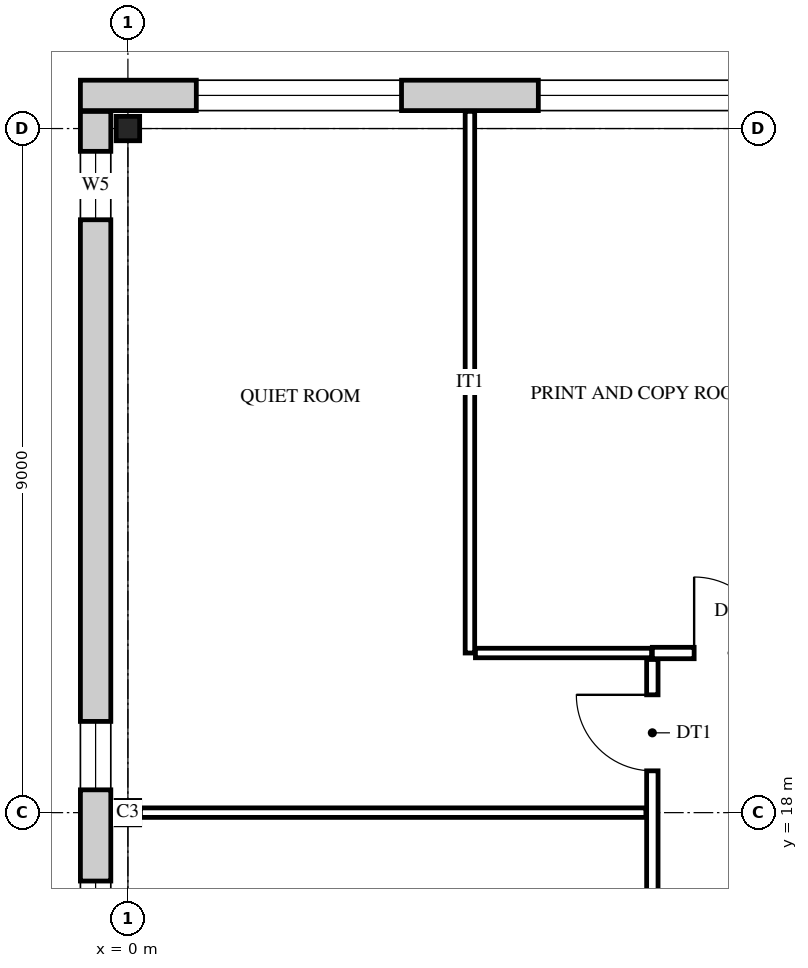
"""IFC4 building model, lengths in metres.
Left out: names, types, materials, properties, quantities, classifications, styles, units other than length and angle.
Written with IfcOpenShell. Run it as: python <this file> out.ifc"""

import sys

from ifc_helpers import new_model, si_unit, direction, frame, frame_2d, origin, origin_2d, place, context, subcontext, project, spatial, rectangle, i_section, extrude, element, fill, save


model = new_model("IFC4")
c1 = context("Model", 3, precision=1e-05, world=origin(), true_north=direction((0.0, 1.0)))
c2 = subcontext(c1, "Body", "Model", "MODEL_VIEW")
j1 = project(units=[si_unit("LENGTHUNIT", "METRE"), si_unit("PLANEANGLEUNIT", "RADIAN")], contexts=[c1])
p1 = place(None, origin())
s1 = spatial("IfcSite", under=j1, at=p1, CompositionType="ELEMENT")
p2 = place(p1, origin())
s2 = spatial("IfcBuilding", under=s1, at=p2, CompositionType="ELEMENT")
p3 = place(p2, frame((0.0, 0.0, 52.8)))
s3 = spatial("IfcBuildingStorey", under=s2, at=p3, CompositionType="ELEMENT", Elevation=52.8)
for number, where, z_axis, x_axis in (
    (1, (0.0, 18.0, 0.0), (0.0, 0.0, 1.0), (1.0, 0.0, 0.0)),
    (2, (0.0, 27.0, 0.0), (0.0, 0.0, 1.0), (1.0, 0.0, 0.0)),
):
    element("IfcColumn", number, at=place(p3, frame(where, z_axis=z_axis, x_axis=x_axis)), inside=s3, PredefinedType="COLUMN", context=c2, shape_type="SweptSolid", body=[
        extrude(i_section(OverallWidth=0.309, OverallDepth=0.321, WebThickness=0.014, FlangeThickness=0.022, FilletRadius=0.017, at=origin_2d()), origin(), (0.0, 0.0, 1.0), 4.2),
    ])
p4 = place(p3, frame((-0.425, -0.225, 0.0), z_axis=(0.0, 0.0, 1.0), x_axis=(0.0, 1.0, 0.0)))
e3 = element("IfcWall", 3, at=p4, inside=s3, PredefinedType="STANDARD", context=c2, shape_type="SweptSolid", body=[
    extrude(rectangle(XDim=27.45, YDim=0.4, at=frame_2d((13.725, 0.0))), origin(), (0.0, 0.0, 1.0), 4.2),
])
p5 = place(p4, frame((0.525, 0.0, 0.9)))
e4 = element("IfcOpeningElement", 4, at=p5, cuts=e3, PredefinedType="OPENING", context=c2, shape_type="SweptSolid", body=[
    extrude(rectangle(XDim=0.9, YDim=2.0, at=frame_2d((0.45, 1.0))), frame((0.0, 0.21, 0.0), z_axis=(0.0, -1.0, 0.0), x_axis=(1.0, 0.0, 0.0)), (0.0, 0.0, 1.0), 0.42),
])
p6 = place(p4, frame((8.025, 0.0, 0.9)))
e5 = element("IfcOpeningElement", 5, at=p6, cuts=e3, PredefinedType="OPENING", context=c2, shape_type="SweptSolid", body=[
    extrude(rectangle(XDim=0.9, YDim=2.0, at=frame_2d((0.45, 1.0))), frame((0.0, 0.21, 0.0), z_axis=(0.0, -1.0, 0.0), x_axis=(1.0, 0.0, 0.0)), (0.0, 0.0, 1.0), 0.42),
])
p7 = place(p4, frame((10.125, 0.0, 0.9)))
e6 = element("IfcOpeningElement", 6, at=p7, cuts=e3, PredefinedType="OPENING", context=c2, shape_type="SweptSolid", body=[
    extrude(rectangle(XDim=2.7, YDim=2.5, at=frame_2d((1.35, 1.25))), frame((0.0, 0.21, 0.0), z_axis=(0.0, -1.0, 0.0), x_axis=(1.0, 0.0, 0.0)), (0.0, 0.0, 1.0), 0.42),
])
p8 = place(p4, frame((14.625, 0.0, 0.9)))
e7 = element("IfcOpeningElement", 7, at=p8, cuts=e3, PredefinedType="OPENING", context=c2, shape_type="SweptSolid", body=[
    extrude(rectangle(XDim=2.7, YDim=2.5, at=frame_2d((1.35, 1.25))), frame((0.0, 0.21, 0.0), z_axis=(0.0, -1.0, 0.0), x_axis=(1.0, 0.0, 0.0)), (0.0, 0.0, 1.0), 0.42),
])
p9 = place(p4, frame((18.525, 0.0, 0.9)))
e8 = element("IfcOpeningElement", 8, at=p9, cuts=e3, PredefinedType="OPENING", context=c2, shape_type="SweptSolid", body=[
    extrude(rectangle(XDim=0.9, YDim=2.0, at=frame_2d((0.45, 1.0))), frame((0.0, 0.21, 0.0), z_axis=(0.0, -1.0, 0.0), x_axis=(1.0, 0.0, 0.0)), (0.0, 0.0, 1.0), 0.42),
])
p10 = place(p4, frame((26.025, 0.0, 0.9)))
e9 = element("IfcOpeningElement", 9, at=p10, cuts=e3, PredefinedType="OPENING", context=c2, shape_type="SweptSolid", body=[
    extrude(rectangle(XDim=0.9, YDim=2.0, at=frame_2d((0.45, 1.0))), frame((0.0, 0.21, 0.0), z_axis=(0.0, -1.0, 0.0), x_axis=(1.0, 0.0, 0.0)), (0.0, 0.0, 1.0), 0.42),
])
p11 = place(p3, frame((-0.625, 27.436, 0.0), z_axis=(0.0, 0.0, 1.0), x_axis=(1.0, 0.0, 0.0)))
e10 = element("IfcWall", 10, at=p11, inside=s3, PredefinedType="STANDARD", context=c2, shape_type="SweptSolid", body=[
    extrude(rectangle(XDim=32.75, YDim=0.4, at=frame_2d((16.375, 0.0))), origin(), (0.0, 0.0, 1.0), 4.2),
])
p12 = place(p11, frame((1.525, 0.0, 0.9)))
e11 = element("IfcOpeningElement", 11, at=p12, cuts=e10, PredefinedType="OPENING", context=c2, shape_type="SweptSolid", body=[
    extrude(rectangle(XDim=2.7, YDim=2.5, at=frame_2d((1.35, 1.25))), frame((0.0, 0.21, 0.0), z_axis=(0.0, -1.0, 0.0), x_axis=(1.0, 0.0, 0.0)), (0.0, 0.0, 1.0), 0.42),
])
p13 = place(p11, frame((6.025, 0.0, 0.9)))
e12 = element("IfcOpeningElement", 12, at=p13, cuts=e10, PredefinedType="OPENING", context=c2, shape_type="SweptSolid", body=[
    extrude(rectangle(XDim=2.7, YDim=2.5, at=frame_2d((1.35, 1.25))), frame((0.0, 0.21, 0.0), z_axis=(0.0, -1.0, 0.0), x_axis=(1.0, 0.0, 0.0)), (0.0, 0.0, 1.0), 0.42),
])
p14 = place(p11, frame((10.525, 0.0, 0.9)))
e13 = element("IfcOpeningElement", 13, at=p14, cuts=e10, PredefinedType="OPENING", context=c2, shape_type="SweptSolid", body=[
    extrude(rectangle(XDim=2.7, YDim=2.5, at=frame_2d((1.35, 1.25))), frame((0.0, 0.21, 0.0), z_axis=(0.0, -1.0, 0.0), x_axis=(1.0, 0.0, 0.0)), (0.0, 0.0, 1.0), 0.42),
])
p15 = place(p11, frame((15.025, 0.0, 0.9)))
e14 = element("IfcOpeningElement", 14, at=p15, cuts=e10, PredefinedType="OPENING", context=c2, shape_type="SweptSolid", body=[
    extrude(rectangle(XDim=2.7, YDim=2.5, at=frame_2d((1.35, 1.25))), frame((0.0, 0.21, 0.0), z_axis=(0.0, -1.0, 0.0), x_axis=(1.0, 0.0, 0.0)), (0.0, 0.0, 1.0), 0.42),
])
p16 = place(p11, frame((19.525, 0.0, 0.9)))
e15 = element("IfcOpeningElement", 15, at=p16, cuts=e10, PredefinedType="OPENING", context=c2, shape_type="SweptSolid", body=[
    extrude(rectangle(XDim=2.7, YDim=2.5, at=frame_2d((1.35, 1.25))), frame((0.0, 0.21, 0.0), z_axis=(0.0, -1.0, 0.0), x_axis=(1.0, 0.0, 0.0)), (0.0, 0.0, 1.0), 0.42),
])
p17 = place(p11, frame((24.025, 0.0, 0.9)))
e16 = element("IfcOpeningElement", 16, at=p17, cuts=e10, PredefinedType="OPENING", context=c2, shape_type="SweptSolid", body=[
    extrude(rectangle(XDim=2.7, YDim=2.5, at=frame_2d((1.35, 1.25))), frame((0.0, 0.21, 0.0), z_axis=(0.0, -1.0, 0.0), x_axis=(1.0, 0.0, 0.0)), (0.0, 0.0, 1.0), 0.42),
])
p18 = place(p11, frame((28.525, 0.0, 0.9)))
e17 = element("IfcOpeningElement", 17, at=p18, cuts=e10, PredefinedType="OPENING", context=c2, shape_type="SweptSolid", body=[
    extrude(rectangle(XDim=2.7, YDim=2.5, at=frame_2d((1.35, 1.25))), frame((0.0, 0.21, 0.0), z_axis=(0.0, -1.0, 0.0), x_axis=(1.0, 0.0, 0.0)), (0.0, 0.0, 1.0), 0.42),
])
p19 = place(p3, frame((4.5, 20.1, 0.0), z_axis=(0.0, 0.0, 1.0), x_axis=(0.0, 1.0, 0.0)))
e18 = element("IfcWall", 18, at=p19, inside=s3, PredefinedType="PARTITIONING", context=c2, shape_type="SweptSolid", body=[
    extrude(rectangle(XDim=7.126, YDim=0.125, at=frame_2d((3.563, 0.0))), origin(), (0.0, 0.0, 1.0), 3.542),
])
p20 = place(p3, frame((6.9, 6.985, 0.0), z_axis=(0.0, 0.0, 1.0), x_axis=(0.0, 1.0, 0.0)))
e19 = element("IfcWall", 19, at=p20, inside=s3, PredefinedType="PARTITIONING", context=c2, shape_type="SweptSolid", body=[
    extrude(rectangle(XDim=13.03, YDim=0.15, at=frame_2d((6.515, 0.0))), origin(), (0.0, 0.0, 1.0), 3.542),
])
p21 = place(p20, frame((11.565, 0.0, 0.0)))
e20 = element("IfcOpeningElement", 20, at=p21, cuts=e19, PredefinedType="OPENING", context=c2, shape_type="SweptSolid", body=[
    extrude(rectangle(XDim=1.0, YDim=2.1, at=frame_2d((0.5, 1.05))), frame((0.0, 0.085, 0.0), z_axis=(0.0, -1.0, 0.0), x_axis=(1.0, 0.0, 0.0)), (0.0, 0.0, 1.0), 0.17),
])
p22 = place(p20, frame((3.765, 0.0, 0.0)))
e21 = element("IfcOpeningElement", 21, at=p22, cuts=e19, PredefinedType="OPENING", context=c2, shape_type="SweptSolid", body=[
    extrude(rectangle(XDim=1.0, YDim=2.1, at=frame_2d((0.5, 1.05))), frame((0.0, 0.085, 0.0), z_axis=(0.0, -1.0, 0.0), x_axis=(1.0, 0.0, 0.0)), (0.0, 0.0, 1.0), 0.17),
])
p23 = place(p20, frame((8.265, 0.0, 0.0)))
e22 = element("IfcOpeningElement", 22, at=p23, cuts=e19, PredefinedType="OPENING", context=c2, shape_type="SweptSolid", body=[
    extrude(rectangle(XDim=1.0, YDim=2.1, at=frame_2d((0.5, 1.05))), frame((0.0, 0.085, 0.0), z_axis=(0.0, -1.0, 0.0), x_axis=(1.0, 0.0, 0.0)), (0.0, 0.0, 1.0), 0.17),
])
p24 = place(p3, frame((0.165, 18.0, 0.0), z_axis=(0.0, 0.0, 1.0), x_axis=(1.0, 0.0, 0.0)))
e23 = element("IfcWall", 23, at=p24, inside=s3, PredefinedType="PARTITIONING", context=c2, shape_type="SweptSolid", body=[
    extrude(rectangle(XDim=6.65, YDim=0.125, at=frame_2d((3.325, 0.0))), origin(), (0.0, 0.0, 1.0), 3.542),
])
p25 = place(p3, frame((4.573, 20.1, 0.0), z_axis=(0.0, 0.0, 1.0), x_axis=(1.0, 0.0, 0.0)))
e24 = element("IfcWall", 24, at=p25, inside=s3, PredefinedType="PARTITIONING", context=c2, shape_type="SweptSolid", body=[
    extrude(rectangle(XDim=2.317, YDim=0.125, at=frame_2d((1.159, 0.0))), origin(), (0.0, 0.0, 1.0), 3.542),
])
p26 = place(p3, frame((6.9, 20.1, 0.0), z_axis=(0.0, 0.0, 1.0), x_axis=(1.0, 0.0, 0.0)))
e25 = element("IfcWall", 25, at=p26, inside=s3, PredefinedType="PARTITIONING", context=c2, shape_type="SweptSolid", body=[
    extrude(rectangle(XDim=20.1, YDim=0.15, at=frame_2d((10.05, 0.0))), origin(), (0.0, 0.0, 1.0), 3.542),
])
p27 = place(p26, frame((0.55, 0.0, 0.0)))
e26 = element("IfcOpeningElement", 26, at=p27, cuts=e25, PredefinedType="OPENING", context=c2, shape_type="SweptSolid", body=[
    extrude(rectangle(XDim=1.0, YDim=2.1, at=frame_2d((0.5, 1.05))), frame((0.0, 0.085, 0.0), z_axis=(0.0, -1.0, 0.0), x_axis=(1.0, 0.0, 0.0)), (0.0, 0.0, 1.0), 0.17),
])
p28 = place(p26, frame((3.85, 0.0, 0.0)))
e27 = element("IfcOpeningElement", 27, at=p28, cuts=e25, PredefinedType="OPENING", context=c2, shape_type="SweptSolid", body=[
    extrude(rectangle(XDim=1.0, YDim=2.1, at=frame_2d((0.5, 1.05))), frame((0.0, 0.085, 0.0), z_axis=(0.0, -1.0, 0.0), x_axis=(1.0, 0.0, 0.0)), (0.0, 0.0, 1.0), 0.17),
])
p29 = place(p26, frame((8.35, 0.0, 0.0)))
e28 = element("IfcOpeningElement", 28, at=p29, cuts=e25, PredefinedType="OPENING", context=c2, shape_type="SweptSolid", body=[
    extrude(rectangle(XDim=1.0, YDim=2.1, at=frame_2d((0.5, 1.05))), frame((0.0, 0.085, 0.0), z_axis=(0.0, -1.0, 0.0), x_axis=(1.0, 0.0, 0.0)), (0.0, 0.0, 1.0), 0.17),
])
p30 = place(p26, frame((12.85, 0.0, 0.0)))
e29 = element("IfcOpeningElement", 29, at=p30, cuts=e25, PredefinedType="OPENING", context=c2, shape_type="SweptSolid", body=[
    extrude(rectangle(XDim=1.0, YDim=2.1, at=frame_2d((0.5, 1.05))), frame((0.0, 0.085, 0.0), z_axis=(0.0, -1.0, 0.0), x_axis=(1.0, 0.0, 0.0)), (0.0, 0.0, 1.0), 0.17),
])
p31 = place(p26, frame((18.55, 0.0, 0.0)))
e30 = element("IfcOpeningElement", 30, at=p31, cuts=e25, PredefinedType="OPENING", context=c2, shape_type="SweptSolid", body=[
    extrude(rectangle(XDim=1.0, YDim=2.1, at=frame_2d((0.5, 1.05))), frame((0.0, 0.085, 0.0), z_axis=(0.0, -1.0, 0.0), x_axis=(1.0, 0.0, 0.0)), (0.0, 0.0, 1.0), 0.17),
])
p32 = place(p8, origin())
e31 = element("IfcWindow", 31, at=p32, inside=s3, PartitioningType="SINGLE_PANEL", PredefinedType="WINDOW", context=c2, shape_type="SweptSolid", body=[
    extrude(rectangle(XDim=2.7, YDim=2.5, at=frame_2d((1.35, 1.25))), frame((0.0, 0.03, 0.0), z_axis=(0.0, -1.0, 0.0), x_axis=(1.0, 0.0, 0.0)), (0.0, 0.0, 1.0), 0.06),
])
fill(e7, e31)
p33 = place(p9, origin())
e32 = element("IfcWindow", 32, at=p33, inside=s3, PartitioningType="SINGLE_PANEL", PredefinedType="WINDOW", context=c2, shape_type="SweptSolid", body=[
    extrude(rectangle(XDim=0.9, YDim=2.0, at=frame_2d((0.45, 1.0))), frame((0.0, 0.03, 0.0), z_axis=(0.0, -1.0, 0.0), x_axis=(1.0, 0.0, 0.0)), (0.0, 0.0, 1.0), 0.06),
])
fill(e8, e32)
p34 = place(p10, origin())
e33 = element("IfcWindow", 33, at=p34, inside=s3, PartitioningType="SINGLE_PANEL", PredefinedType="WINDOW", context=c2, shape_type="SweptSolid", body=[
    extrude(rectangle(XDim=0.9, YDim=2.0, at=frame_2d((0.45, 1.0))), frame((0.0, 0.03, 0.0), z_axis=(0.0, -1.0, 0.0), x_axis=(1.0, 0.0, 0.0)), (0.0, 0.0, 1.0), 0.06),
])
fill(e9, e33)
p35 = place(p12, origin())
e34 = element("IfcWindow", 34, at=p35, inside=s3, PartitioningType="SINGLE_PANEL", PredefinedType="WINDOW", context=c2, shape_type="SweptSolid", body=[
    extrude(rectangle(XDim=2.7, YDim=2.5, at=frame_2d((1.35, 1.25))), frame((0.0, 0.03, 0.0), z_axis=(0.0, -1.0, 0.0), x_axis=(1.0, 0.0, 0.0)), (0.0, 0.0, 1.0), 0.06),
])
fill(e11, e34)
p36 = place(p13, origin())
e35 = element("IfcWindow", 35, at=p36, inside=s3, PartitioningType="SINGLE_PANEL", PredefinedType="WINDOW", context=c2, shape_type="SweptSolid", body=[
    extrude(rectangle(XDim=2.7, YDim=2.5, at=frame_2d((1.35, 1.25))), frame((0.0, 0.03, 0.0), z_axis=(0.0, -1.0, 0.0), x_axis=(1.0, 0.0, 0.0)), (0.0, 0.0, 1.0), 0.06),
])
fill(e12, e35)
p37 = place(p21, origin())
e36 = element("IfcDoor", 36, at=p37, inside=s3, OperationType="SINGLE_SWING_RIGHT", PredefinedType="DOOR", context=c2, shape_type="SweptSolid", body=[
    extrude(rectangle(XDim=1.0, YDim=2.1, at=frame_2d((0.5, 1.05))), frame((0.0, 0.025, 0.0), z_axis=(0.0, -1.0, 0.0), x_axis=(1.0, 0.0, 0.0)), (0.0, 0.0, 1.0), 0.05),
])
fill(e20, e36)
p38 = place(p27, origin())
e37 = element("IfcDoor", 37, at=p38, inside=s3, OperationType="SINGLE_SWING_LEFT", PredefinedType="DOOR", context=c2, shape_type="SweptSolid", body=[
    extrude(rectangle(XDim=1.0, YDim=2.1, at=frame_2d((0.5, 1.05))), frame((0.0, 0.025, 0.0), z_axis=(0.0, -1.0, 0.0), x_axis=(1.0, 0.0, 0.0)), (0.0, 0.0, 1.0), 0.05),
])
fill(e26, e37)
save(model, sys.argv[1])
